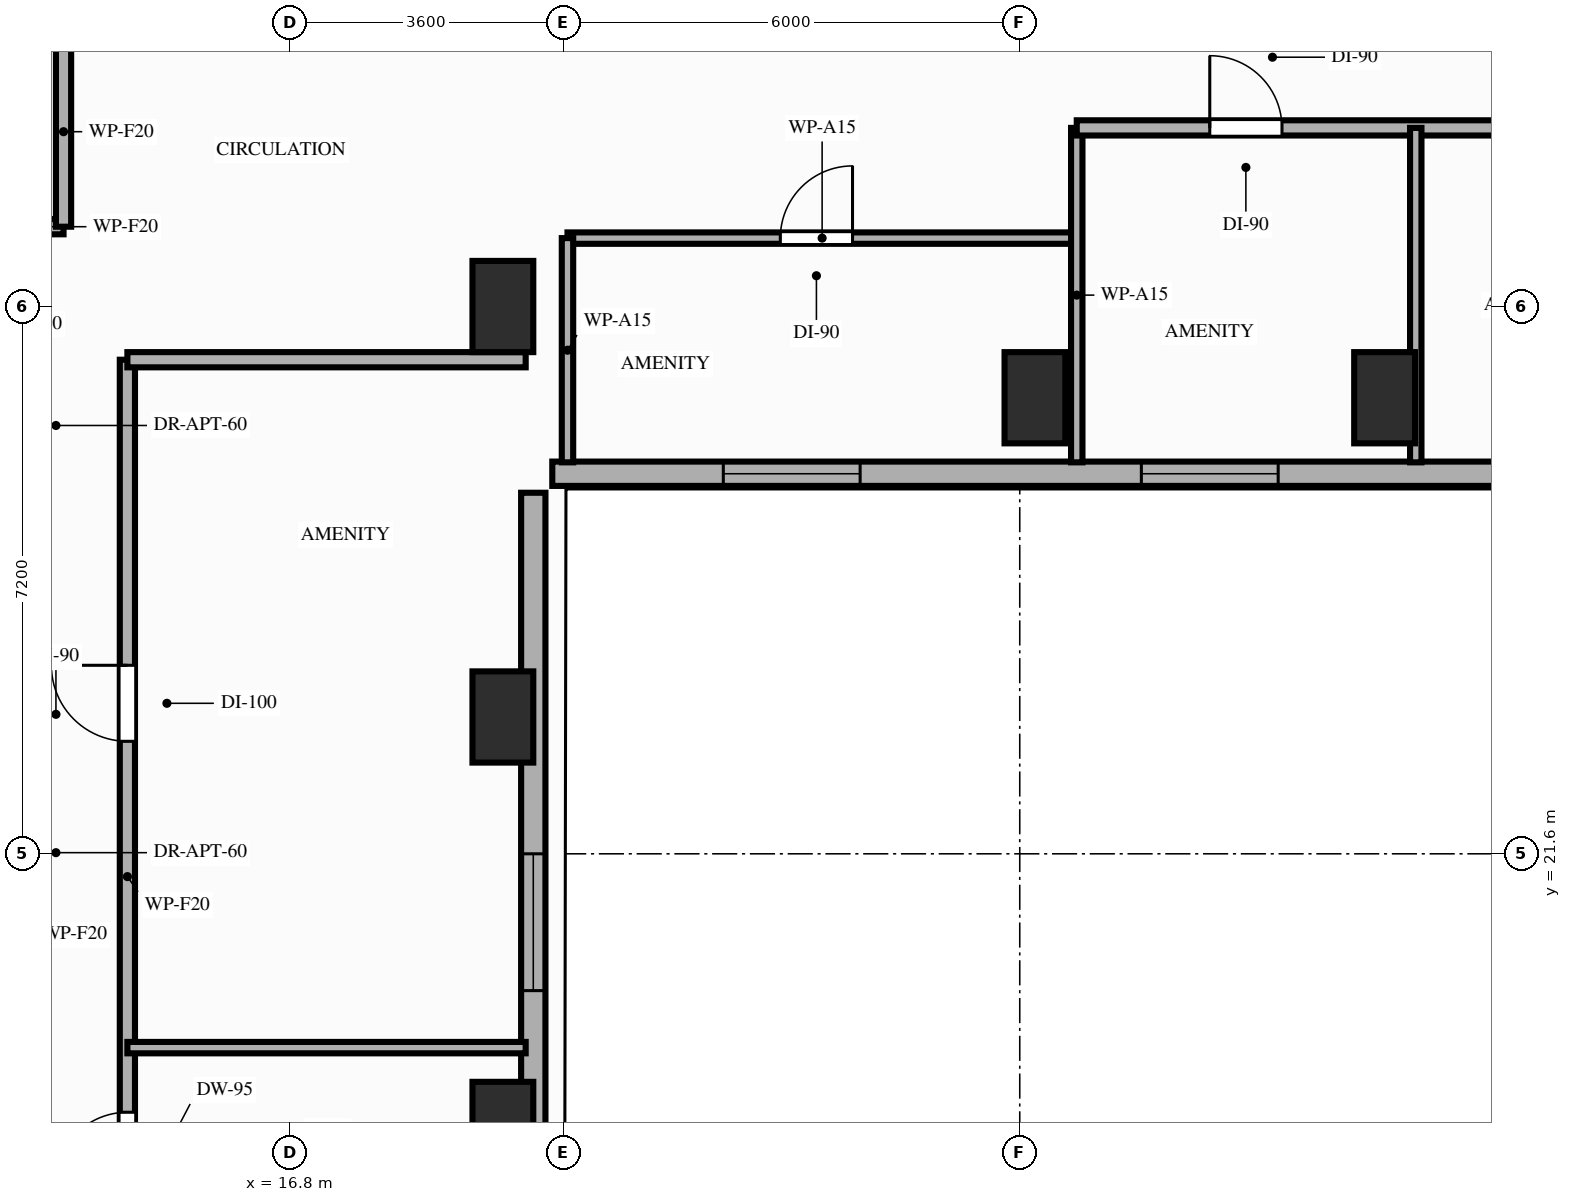
"""IFC4 building model, lengths in metres.
Left out: names, types, materials, properties, quantities, classifications, styles, units other than length and angle.
Written with IfcOpenShell. Run it as: python <this file> out.ifc"""

import sys

from ifc_helpers import new_model, si_unit, direction, frame, frame_2d, origin, origin_2d, place, context, subcontext, project, spatial, rectangle, extrude, element, fill, save


model = new_model("IFC4")
c1 = context("Model", 3, precision=1e-05, world=origin(), true_north=direction((0.0, 1.0)))
c2 = subcontext(c1, "Body", "Model", "MODEL_VIEW")
j1 = project(units=[si_unit("LENGTHUNIT", "METRE"), si_unit("PLANEANGLEUNIT", "RADIAN")], contexts=[c1])
p1 = place(None, origin())
s1 = spatial("IfcSite", under=j1, at=p1, CompositionType="ELEMENT")
p2 = place(p1, origin())
s2 = spatial("IfcBuilding", under=s1, at=p2, CompositionType="ELEMENT")
p3 = place(p2, frame((0.0, 0.0, 83.4)))
s3 = spatial("IfcBuildingStorey", under=s2, at=p3, CompositionType="ELEMENT", Elevation=83.4)
for number, where, z_axis, x_axis in (
    (1, (19.6, 18.0, 0.0), (0.0, 0.0, 1.0), (1.0, 0.0, 0.0)),
    (2, (19.6, 23.4, 0.0), (0.0, 0.0, 1.0), (1.0, 0.0, 0.0)),
    (3, (19.6, 28.8, 0.0), (0.0, 0.0, 1.0), (1.0, 0.0, 0.0)),
    (4, (26.6, 27.6, 0.0), (0.0, 0.0, 1.0), (1.0, 0.0, 0.0)),
    (5, (31.2, 27.6, 0.0), (0.0, 0.0, 1.0), (1.0, 0.0, 0.0)),
):
    element("IfcColumn", number, at=place(p3, frame(where, z_axis=z_axis, x_axis=x_axis)), inside=s3, PredefinedType="COLUMN", context=c2, shape_type="SweptSolid", body=[
        extrude(rectangle(XDim=0.8, YDim=1.2, at=origin_2d()), origin(), (0.0, 0.0, 1.0), 3.2),
    ])
p4 = place(p3, frame((20.0, 8.8, 0.0), z_axis=(0.0, 0.0, 1.0), x_axis=(0.0, 1.0, 0.0)))
e6 = element("IfcWall", 6, at=p4, inside=s3, PredefinedType="STANDARD", context=c2, shape_type="SweptSolid", body=[
    extrude(rectangle(XDim=17.55, YDim=0.32, at=frame_2d((8.775, 0.0))), origin(), (0.0, 0.0, 1.0), 2.41),
])
p5 = place(p4, frame((5.95, 0.0, 0.85)))
e7 = element("IfcOpeningElement", 7, at=p5, cuts=e6, PredefinedType="OPENING", context=c2, shape_type="SweptSolid", body=[
    extrude(rectangle(XDim=1.8, YDim=1.31, at=frame_2d((0.9, 0.655))), frame((0.0, 0.17, 0.0), z_axis=(0.0, -1.0, 0.0), x_axis=(1.0, 0.0, 0.0)), (0.0, 0.0, 1.0), 0.34),
])
p6 = place(p4, frame((11.0, 0.0, 0.85)))
e8 = element("IfcOpeningElement", 8, at=p6, cuts=e6, PredefinedType="OPENING", context=c2, shape_type="SweptSolid", body=[
    extrude(rectangle(XDim=1.8, YDim=1.31, at=frame_2d((0.9, 0.655))), frame((0.0, 0.17, 0.0), z_axis=(0.0, -1.0, 0.0), x_axis=(1.0, 0.0, 0.0)), (0.0, 0.0, 1.0), 0.34),
])
p7 = place(p3, frame((20.25, 26.6, 0.0), z_axis=(0.0, 0.0, 1.0), x_axis=(1.0, 0.0, 0.0)))
e9 = element("IfcWall", 9, at=p7, inside=s3, PredefinedType="STANDARD", context=c2, shape_type="SweptSolid", body=[
    extrude(rectangle(XDim=26.15, YDim=0.32, at=frame_2d((13.075, 0.0))), origin(), (0.0, 0.0, 1.0), 2.71),
])
p8 = place(p7, frame((13.9, 0.0, 0.0)))
e10 = element("IfcOpeningElement", 10, at=p8, cuts=e9, PredefinedType="OPENING", context=c2, shape_type="SweptSolid", body=[
    extrude(rectangle(XDim=1.3, YDim=2.08, at=frame_2d((0.65, 1.04))), frame((0.0, 0.17, 0.0), z_axis=(0.0, -1.0, 0.0), x_axis=(1.0, 0.0, 0.0)), (0.0, 0.0, 1.0), 0.34),
])
p9 = place(p7, frame((2.25, 0.0, 0.85)))
e11 = element("IfcOpeningElement", 11, at=p9, cuts=e9, PredefinedType="OPENING", context=c2, shape_type="SweptSolid", body=[
    extrude(rectangle(XDim=1.8, YDim=1.61, at=frame_2d((0.9, 0.805))), frame((0.0, 0.17, 0.0), z_axis=(0.0, -1.0, 0.0), x_axis=(1.0, 0.0, 0.0)), (0.0, 0.0, 1.0), 0.34),
])
p10 = place(p7, frame((7.75, 0.0, 0.85)))
e12 = element("IfcOpeningElement", 12, at=p10, cuts=e9, PredefinedType="OPENING", context=c2, shape_type="SweptSolid", body=[
    extrude(rectangle(XDim=1.8, YDim=1.61, at=frame_2d((0.9, 0.805))), frame((0.0, 0.17, 0.0), z_axis=(0.0, -1.0, 0.0), x_axis=(1.0, 0.0, 0.0)), (0.0, 0.0, 1.0), 0.34),
])
p11 = place(p7, frame((22.25, 0.0, 0.85)))
e13 = element("IfcOpeningElement", 13, at=p11, cuts=e9, PredefinedType="OPENING", context=c2, shape_type="SweptSolid", body=[
    extrude(rectangle(XDim=1.8, YDim=1.61, at=frame_2d((0.9, 0.805))), frame((0.0, 0.17, 0.0), z_axis=(0.0, -1.0, 0.0), x_axis=(1.0, 0.0, 0.0)), (0.0, 0.0, 1.0), 0.34),
])
p12 = place(p3, frame((12.55, 29.85, 0.0), z_axis=(0.0, 0.0, 1.0), x_axis=(1.0, 0.0, 0.0)))
e14 = element("IfcWall", 14, at=p12, inside=s3, PredefinedType="PARTITIONING", context=c2, shape_type="SweptSolid", body=[
    extrude(rectangle(XDim=1.27, YDim=0.2, at=frame_2d((0.635, 0.0))), origin(), (0.0, 0.0, 1.0), 3.02),
])
p13 = place(p12, frame((0.21, 0.0, 0.0)))
e15 = element("IfcOpeningElement", 15, at=p13, cuts=e14, PredefinedType="OPENING", context=c2, shape_type="SweptSolid", body=[
    extrude(rectangle(XDim=0.85, YDim=2.05, at=frame_2d((0.425, 1.025))), frame((0.0, 0.11, 0.0), z_axis=(0.0, -1.0, 0.0), x_axis=(1.0, 0.0, 0.0)), (0.0, 0.0, 1.0), 0.22),
])
p14 = place(p3, frame((13.82, 29.85, 0.0), z_axis=(0.0, 0.0, 1.0), x_axis=(0.0, 1.0, 0.0)))
e16 = element("IfcWall", 16, at=p14, inside=s3, PredefinedType="PARTITIONING", context=c2, shape_type="SweptSolid", body=[
    extrude(rectangle(XDim=2.5, YDim=0.2, at=frame_2d((1.25, 0.0))), origin(), (0.0, 0.0, 1.0), 3.02),
])
p15 = place(p3, frame((14.66, 14.5, 0.0), z_axis=(0.0, 0.0, 1.0), x_axis=(0.0, 1.0, 0.0)))
e17 = element("IfcWall", 17, at=p15, inside=s3, PredefinedType="PARTITIONING", context=c2, shape_type="SweptSolid", body=[
    extrude(rectangle(XDim=13.6, YDim=0.2, at=frame_2d((6.8, 0.0))), origin(), (0.0, 0.0, 1.0), 2.41),
])
p16 = place(p15, frame((0.45, 0.0, 0.0)))
e18 = element("IfcOpeningElement", 18, at=p16, cuts=e17, PredefinedType="OPENING", context=c2, shape_type="SweptSolid", body=[
    extrude(rectangle(XDim=0.95, YDim=2.15, at=frame_2d((0.475, 1.075))), frame((0.0, 0.11, 0.0), z_axis=(0.0, -1.0, 0.0), x_axis=(1.0, 0.0, 0.0)), (0.0, 0.0, 1.0), 0.22),
])
p17 = place(p15, frame((2.75, 0.0, 0.0)))
e19 = element("IfcOpeningElement", 19, at=p17, cuts=e17, PredefinedType="OPENING", context=c2, shape_type="SweptSolid", body=[
    extrude(rectangle(XDim=0.95, YDim=2.1, at=frame_2d((0.475, 1.05))), frame((0.0, 0.11, 0.0), z_axis=(0.0, -1.0, 0.0), x_axis=(1.0, 0.0, 0.0)), (0.0, 0.0, 1.0), 0.22),
])
p18 = place(p15, frame((8.58, 0.0, 0.0)))
e20 = element("IfcOpeningElement", 20, at=p18, cuts=e17, PredefinedType="OPENING", context=c2, shape_type="SweptSolid", body=[
    extrude(rectangle(XDim=1.0, YDim=2.15, at=frame_2d((0.5, 1.075))), frame((0.0, 0.11, 0.0), z_axis=(0.0, -1.0, 0.0), x_axis=(1.0, 0.0, 0.0)), (0.0, 0.0, 1.0), 0.22),
])
p19 = place(p3, frame((14.66, 28.1, 0.0), z_axis=(0.0, 0.0, 1.0), x_axis=(1.0, 0.0, 0.0)))
e21 = element("IfcWall", 21, at=p19, inside=s3, PredefinedType="PARTITIONING", context=c2, shape_type="SweptSolid", body=[
    extrude(rectangle(XDim=5.24, YDim=0.2, at=frame_2d((2.62, 0.0))), origin(), (0.0, 0.0, 1.0), 2.41),
])
p20 = place(p3, frame((20.45, 29.7, 0.0), z_axis=(0.0, 0.0, 1.0), x_axis=(1.0, 0.0, 0.0)))
e22 = element("IfcWall", 22, at=p20, inside=s3, PredefinedType="PARTITIONING", context=c2, shape_type="SweptSolid", body=[
    extrude(rectangle(XDim=6.7, YDim=0.15, at=frame_2d((3.35, 0.0))), origin(), (0.0, 0.0, 1.0), 3.02),
])
p21 = place(p20, frame((2.8, 0.0, 0.0)))
e23 = element("IfcOpeningElement", 23, at=p21, cuts=e22, PredefinedType="OPENING", context=c2, shape_type="SweptSolid", body=[
    extrude(rectangle(XDim=0.95, YDim=2.15, at=frame_2d((0.475, 1.075))), frame((0.0, 0.085, 0.0), z_axis=(0.0, -1.0, 0.0), x_axis=(1.0, 0.0, 0.0)), (0.0, 0.0, 1.0), 0.17),
])
p22 = place(p3, frame((20.45, 26.75, 0.0), z_axis=(0.0, 0.0, 1.0), x_axis=(0.0, 1.0, 0.0)))
e24 = element("IfcWall", 24, at=p22, inside=s3, PredefinedType="PARTITIONING", context=c2, shape_type="SweptSolid", body=[
    extrude(rectangle(XDim=2.95, YDim=0.15, at=frame_2d((1.475, 0.0))), origin(), (0.0, 0.0, 1.0), 2.41),
])
p23 = place(p3, frame((27.15, 26.75, 0.0), z_axis=(0.0, 0.0, 1.0), x_axis=(0.0, 1.0, 0.0)))
e25 = element("IfcWall", 25, at=p23, inside=s3, PredefinedType="PARTITIONING", context=c2, shape_type="SweptSolid", body=[
    extrude(rectangle(XDim=4.4, YDim=0.15, at=frame_2d((2.2, 0.0))), origin(), (0.0, 0.0, 1.0), 2.41),
])
p24 = place(p3, frame((14.66, 19.05, 0.0), z_axis=(0.0, 0.0, 1.0), x_axis=(1.0, 0.0, 0.0)))
e26 = element("IfcWall", 26, at=p24, inside=s3, PredefinedType="PARTITIONING", context=c2, shape_type="SweptSolid", body=[
    extrude(rectangle(XDim=5.24, YDim=0.15, at=frame_2d((2.62, 0.0))), origin(), (0.0, 0.0, 1.0), 2.41),
])
p25 = place(p3, frame((27.15, 31.15, 0.0), z_axis=(0.0, 0.0, 1.0), x_axis=(1.0, 0.0, 0.0)))
e27 = element("IfcWall", 27, at=p25, inside=s3, PredefinedType="PARTITIONING", context=c2, shape_type="SweptSolid", body=[
    extrude(rectangle(XDim=13.95, YDim=0.2, at=frame_2d((6.975, 0.0))), origin(), (0.0, 0.0, 1.0), 2.41),
])
p26 = place(p25, frame((1.75, 0.0, 0.0)))
e28 = element("IfcOpeningElement", 28, at=p26, cuts=e27, PredefinedType="OPENING", context=c2, shape_type="SweptSolid", body=[
    extrude(rectangle(XDim=0.95, YDim=2.15, at=frame_2d((0.475, 1.075))), frame((0.0, 0.11, 0.0), z_axis=(0.0, -1.0, 0.0), x_axis=(1.0, 0.0, 0.0)), (0.0, 0.0, 1.0), 0.22),
])
p27 = place(p25, frame((6.84, 0.0, 0.0)))
e29 = element("IfcOpeningElement", 29, at=p27, cuts=e27, PredefinedType="OPENING", context=c2, shape_type="SweptSolid", body=[
    extrude(rectangle(XDim=0.95, YDim=2.15, at=frame_2d((0.475, 1.075))), frame((0.0, 0.11, 0.0), z_axis=(0.0, -1.0, 0.0), x_axis=(1.0, 0.0, 0.0)), (0.0, 0.0, 1.0), 0.22),
])
p28 = place(p25, frame((11.59, 0.0, 0.0)))
e30 = element("IfcOpeningElement", 30, at=p28, cuts=e27, PredefinedType="OPENING", context=c2, shape_type="SweptSolid", body=[
    extrude(rectangle(XDim=0.95, YDim=2.15, at=frame_2d((0.475, 1.075))), frame((0.0, 0.11, 0.0), z_axis=(0.0, -1.0, 0.0), x_axis=(1.0, 0.0, 0.0)), (0.0, 0.0, 1.0), 0.22),
])
p29 = place(p3, frame((31.61, 26.75, 0.0), z_axis=(0.0, 0.0, 1.0), x_axis=(0.0, 1.0, 0.0)))
e31 = element("IfcWall", 31, at=p29, inside=s3, PredefinedType="PARTITIONING", context=c2, shape_type="SweptSolid", body=[
    extrude(rectangle(XDim=4.4, YDim=0.15, at=frame_2d((2.2, 0.0))), origin(), (0.0, 0.0, 1.0), 2.41),
])
p30 = place(p6, origin())
e32 = element("IfcWindow", 32, at=p30, inside=s3, PartitioningType="SINGLE_PANEL", PredefinedType="WINDOW", context=c2, shape_type="SweptSolid", body=[
    extrude(rectangle(XDim=1.8, YDim=1.31, at=frame_2d((0.9, 0.655))), frame((0.0, 0.03, 0.0), z_axis=(0.0, -1.0, 0.0), x_axis=(1.0, 0.0, 0.0)), (0.0, 0.0, 1.0), 0.06),
])
fill(e8, e32)
p31 = place(p9, origin())
e33 = element("IfcWindow", 33, at=p31, inside=s3, PartitioningType="SINGLE_PANEL", PredefinedType="WINDOW", context=c2, shape_type="SweptSolid", body=[
    extrude(rectangle(XDim=1.8, YDim=1.61, at=frame_2d((0.9, 0.805))), frame((0.0, 0.03, 0.0), z_axis=(0.0, -1.0, 0.0), x_axis=(1.0, 0.0, 0.0)), (0.0, 0.0, 1.0), 0.06),
])
fill(e11, e33)
p32 = place(p10, origin())
e34 = element("IfcWindow", 34, at=p32, inside=s3, PartitioningType="SINGLE_PANEL", PredefinedType="WINDOW", context=c2, shape_type="SweptSolid", body=[
    extrude(rectangle(XDim=1.8, YDim=1.61, at=frame_2d((0.9, 0.805))), frame((0.0, 0.03, 0.0), z_axis=(0.0, -1.0, 0.0), x_axis=(1.0, 0.0, 0.0)), (0.0, 0.0, 1.0), 0.06),
])
fill(e12, e34)
p33 = place(p21, origin())
e35 = element("IfcDoor", 35, at=p33, inside=s3, OperationType="SINGLE_SWING_RIGHT", PredefinedType="DOOR", context=c2, shape_type="SweptSolid", body=[
    extrude(rectangle(XDim=0.95, YDim=2.15, at=frame_2d((0.475, 1.075))), frame((0.0, 0.025, 0.0), z_axis=(0.0, -1.0, 0.0), x_axis=(1.0, 0.0, 0.0)), (0.0, 0.0, 1.0), 0.05),
])
fill(e23, e35)
p34 = place(p17, origin())
e36 = element("IfcDoor", 36, at=p34, inside=s3, OperationType="SINGLE_SWING_LEFT", PredefinedType="DOOR", context=c2, shape_type="SweptSolid", body=[
    extrude(rectangle(XDim=0.95, YDim=2.1, at=frame_2d((0.475, 1.05))), frame((0.0, 0.025, 0.0), z_axis=(0.0, -1.0, 0.0), x_axis=(1.0, 0.0, 0.0)), (0.0, 0.0, 1.0), 0.05),
])
fill(e19, e36)
p35 = place(p18, origin())
e37 = element("IfcDoor", 37, at=p35, inside=s3, OperationType="SINGLE_SWING_RIGHT", PredefinedType="DOOR", context=c2, shape_type="SweptSolid", body=[
    extrude(rectangle(XDim=1.0, YDim=2.15, at=frame_2d((0.5, 1.075))), frame((0.0, 0.025, 0.0), z_axis=(0.0, -1.0, 0.0), x_axis=(1.0, 0.0, 0.0)), (0.0, 0.0, 1.0), 0.05),
])
fill(e20, e37)
p36 = place(p26, origin())
e38 = element("IfcDoor", 38, at=p36, inside=s3, OperationType="SINGLE_SWING_LEFT", PredefinedType="DOOR", context=c2, shape_type="SweptSolid", body=[
    extrude(rectangle(XDim=0.95, YDim=2.15, at=frame_2d((0.475, 1.075))), frame((0.0, 0.025, 0.0), z_axis=(0.0, -1.0, 0.0), x_axis=(1.0, 0.0, 0.0)), (0.0, 0.0, 1.0), 0.05),
])
fill(e28, e38)
save(model, sys.argv[1])
